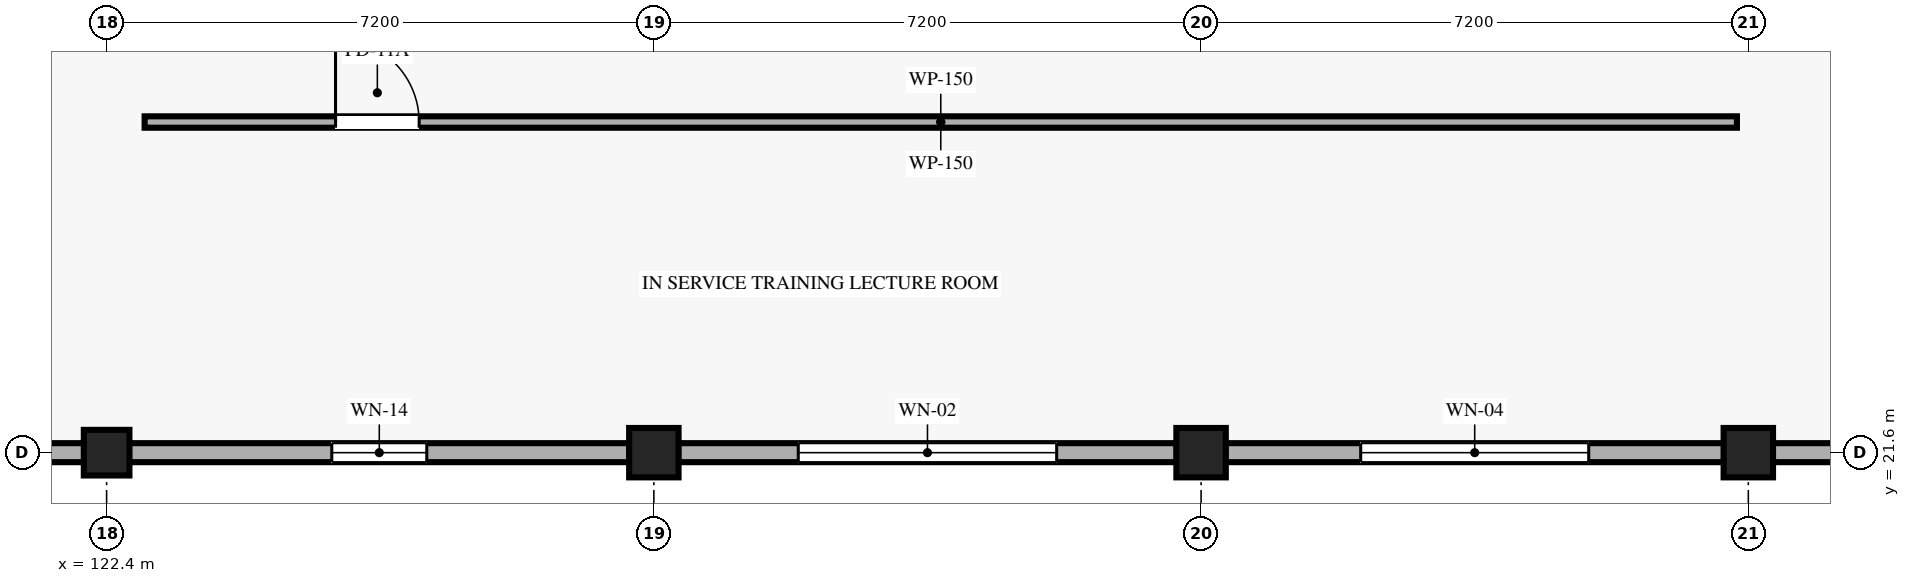
"""IFC4 building model, lengths in metres.
Left out: names, types, materials, properties, quantities, classifications, styles, units other than length and angle.
Written with IfcOpenShell. Run it as: python <this file> out.ifc"""

import sys

from ifc_helpers import new_model, si_unit, direction, frame, frame_2d, origin, origin_2d, place, context, subcontext, project, spatial, rectangle, extrude, element, fill, save


model = new_model("IFC4")
c1 = context("Model", 3, precision=1e-05, world=origin(), true_north=direction((0.0, 1.0)))
c2 = subcontext(c1, "Body", "Model", "MODEL_VIEW")
j1 = project(units=[si_unit("LENGTHUNIT", "METRE"), si_unit("PLANEANGLEUNIT", "RADIAN")], contexts=[c1])
p1 = place(None, origin())
s1 = spatial("IfcSite", under=j1, at=p1, CompositionType="ELEMENT")
p2 = place(p1, origin())
s2 = spatial("IfcBuilding", under=s1, at=p2, CompositionType="ELEMENT")
p3 = place(p2, frame((0.0, 0.0, 13.5)))
s3 = spatial("IfcBuildingStorey", under=s2, at=p3, CompositionType="ELEMENT", Elevation=13.5)
p4 = place(p3, frame((122.4, 21.6, 0.0), z_axis=(0.0, 0.0, 1.0), x_axis=(1.0, 0.0, 0.0)))
e1 = element("IfcColumn", 1, at=p4, inside=s3, PredefinedType="COLUMN", context=c2, shape_type="SweptSolid", body=[
    extrude(rectangle(XDim=0.6, YDim=0.6, at=origin_2d()), origin(), (0.0, 0.0, 1.0), 4.05),
])
for number, where, z_axis, x_axis in (
    (2, (129.6, 21.6, 0.0), (0.0, 0.0, 1.0), (1.0, 0.0, 0.0)),
    (3, (136.8, 21.6, 0.0), (0.0, 0.0, 1.0), (1.0, 0.0, 0.0)),
    (4, (144.0, 21.6, 0.0), (0.0, 0.0, 1.0), (1.0, 0.0, 0.0)),
):
    element("IfcColumn", number, at=place(p3, frame(where, z_axis=z_axis, x_axis=x_axis)), inside=s3, PredefinedType="COLUMN", context=c2, shape_type="SweptSolid", body=[
        extrude(rectangle(XDim=0.65, YDim=0.65, at=origin_2d()), origin(), (0.0, 0.0, 1.0), 4.05),
    ])
p5 = place(p3, frame((115.495, 21.6, 0.0), z_axis=(0.0, 0.0, 1.0), x_axis=(1.0, 0.0, 0.0)))
e5 = element("IfcWall", 5, at=p5, inside=s3, PredefinedType="SOLIDWALL", context=c2, shape_type="SweptSolid", body=[
    extrude(rectangle(XDim=6.61, YDim=0.25, at=frame_2d((3.305, 0.0))), origin(), (0.0, 0.0, 1.0), 3.195),
])
p6 = place(p5, frame((2.555, 0.0, 0.85)))
e6 = element("IfcOpeningElement", 6, at=p6, cuts=e5, PredefinedType="OPENING", context=c2, shape_type="SweptSolid", body=[
    extrude(rectangle(XDim=1.5, YDim=2.05, at=frame_2d((0.75, 1.025))), frame((0.0, 0.135, 0.0), z_axis=(0.0, -1.0, 0.0), x_axis=(1.0, 0.0, 0.0)), (0.0, 0.0, 1.0), 0.27),
])
p7 = place(p3, frame((122.695, 21.6, 0.0), z_axis=(0.0, 0.0, 1.0), x_axis=(1.0, 0.0, 0.0)))
e7 = element("IfcWall", 7, at=p7, inside=s3, PredefinedType="SOLIDWALL", context=c2, shape_type="SweptSolid", body=[
    extrude(rectangle(XDim=6.585, YDim=0.25, at=frame_2d((3.292, 0.0))), origin(), (0.0, 0.0, 1.0), 3.195),
])
p8 = place(p7, frame((2.667, 0.0, 0.85)))
e8 = element("IfcOpeningElement", 8, at=p8, cuts=e7, PredefinedType="OPENING", context=c2, shape_type="SweptSolid", body=[
    extrude(rectangle(XDim=1.25, YDim=1.5, at=frame_2d((0.625, 0.75))), frame((0.0, 0.135, 0.0), z_axis=(0.0, -1.0, 0.0), x_axis=(1.0, 0.0, 0.0)), (0.0, 0.0, 1.0), 0.27),
])
p9 = place(p3, frame((129.92, 21.6, 0.0), z_axis=(0.0, 0.0, 1.0), x_axis=(1.0, 0.0, 0.0)))
e9 = element("IfcWall", 9, at=p9, inside=s3, PredefinedType="SOLIDWALL", context=c2, shape_type="SweptSolid", body=[
    extrude(rectangle(XDim=6.56, YDim=0.25, at=frame_2d((3.28, 0.0))), origin(), (0.0, 0.0, 1.0), 3.195),
])
p10 = place(p9, frame((1.58, 0.0, 0.85)))
e10 = element("IfcOpeningElement", 10, at=p10, cuts=e9, PredefinedType="OPENING", context=c2, shape_type="SweptSolid", body=[
    extrude(rectangle(XDim=3.4, YDim=2.0, at=frame_2d((1.7, 1.0))), frame((0.0, 0.135, 0.0), z_axis=(0.0, -1.0, 0.0), x_axis=(1.0, 0.0, 0.0)), (0.0, 0.0, 1.0), 0.27),
])
p11 = place(p3, frame((137.12, 21.6, 0.0), z_axis=(0.0, 0.0, 1.0), x_axis=(1.0, 0.0, 0.0)))
e11 = element("IfcWall", 11, at=p11, inside=s3, PredefinedType="SOLIDWALL", context=c2, shape_type="SweptSolid", body=[
    extrude(rectangle(XDim=6.56, YDim=0.25, at=frame_2d((3.28, 0.0))), origin(), (0.0, 0.0, 1.0), 3.195),
])
p12 = place(p11, frame((1.78, 0.0, 0.85)))
e12 = element("IfcOpeningElement", 12, at=p12, cuts=e11, PredefinedType="OPENING", context=c2, shape_type="SweptSolid", body=[
    extrude(rectangle(XDim=3.0, YDim=1.9, at=frame_2d((1.5, 0.95))), frame((0.0, 0.135, 0.0), z_axis=(0.0, -1.0, 0.0), x_axis=(1.0, 0.0, 0.0)), (0.0, 0.0, 1.0), 0.27),
])
p13 = place(p3, frame((144.32, 21.6, 0.0), z_axis=(0.0, 0.0, 1.0), x_axis=(1.0, 0.0, 0.0)))
e13 = element("IfcWall", 13, at=p13, inside=s3, PredefinedType="SOLIDWALL", context=c2, shape_type="SweptSolid", body=[
    extrude(rectangle(XDim=6.56, YDim=0.25, at=frame_2d((3.28, 0.0))), origin(), (0.0, 0.0, 1.0), 3.195),
])
p14 = place(p13, frame((1.98, 0.0, 0.85)))
e14 = element("IfcOpeningElement", 14, at=p14, cuts=e13, PredefinedType="OPENING", context=c2, shape_type="SweptSolid", body=[
    extrude(rectangle(XDim=2.6, YDim=1.8, at=frame_2d((1.3, 0.9))), frame((0.0, 0.135, 0.0), z_axis=(0.0, -1.0, 0.0), x_axis=(1.0, 0.0, 0.0)), (0.0, 0.0, 1.0), 0.27),
])
p15 = place(p3, frame((122.9, 25.95, 0.0), z_axis=(0.0, 0.0, 1.0), x_axis=(1.0, 0.0, 0.0)))
e15 = element("IfcWall", 15, at=p15, inside=s3, PredefinedType="PARTITIONING", context=c2, shape_type="SweptSolid", body=[
    extrude(rectangle(XDim=20.95, YDim=0.15, at=frame_2d((10.475, 0.0))), origin(), (0.0, 0.0, 1.0), 3.81),
])
p16 = place(p15, frame((2.512, 0.0, 0.0)))
e16 = element("IfcOpeningElement", 16, at=p16, cuts=e15, PredefinedType="OPENING", context=c2, shape_type="SweptSolid", body=[
    extrude(rectangle(XDim=1.1, YDim=2.2, at=frame_2d((0.55, 1.1))), frame((0.0, 0.085, 0.0), z_axis=(0.0, -1.0, 0.0), x_axis=(1.0, 0.0, 0.0)), (0.0, 0.0, 1.0), 0.17),
])
p17 = place(p8, origin())
e17 = element("IfcWindow", 17, at=p17, inside=s3, PartitioningType="SINGLE_PANEL", PredefinedType="WINDOW", context=c2, shape_type="SweptSolid", body=[
    extrude(rectangle(XDim=1.25, YDim=1.5, at=frame_2d((0.625, 0.75))), frame((0.0, 0.03, 0.0), z_axis=(0.0, -1.0, 0.0), x_axis=(1.0, 0.0, 0.0)), (0.0, 0.0, 1.0), 0.06),
])
fill(e8, e17)
p18 = place(p10, origin())
e18 = element("IfcWindow", 18, at=p18, inside=s3, PartitioningType="SINGLE_PANEL", PredefinedType="WINDOW", context=c2, shape_type="SweptSolid", body=[
    extrude(rectangle(XDim=3.4, YDim=2.0, at=frame_2d((1.7, 1.0))), frame((0.0, 0.03, 0.0), z_axis=(0.0, -1.0, 0.0), x_axis=(1.0, 0.0, 0.0)), (0.0, 0.0, 1.0), 0.06),
])
fill(e10, e18)
p19 = place(p12, origin())
e19 = element("IfcWindow", 19, at=p19, inside=s3, PartitioningType="SINGLE_PANEL", PredefinedType="WINDOW", context=c2, shape_type="SweptSolid", body=[
    extrude(rectangle(XDim=3.0, YDim=1.9, at=frame_2d((1.5, 0.95))), frame((0.0, 0.03, 0.0), z_axis=(0.0, -1.0, 0.0), x_axis=(1.0, 0.0, 0.0)), (0.0, 0.0, 1.0), 0.06),
])
fill(e12, e19)
p20 = place(p16, origin())
e20 = element("IfcDoor", 20, at=p20, inside=s3, OperationType="SINGLE_SWING_LEFT", PredefinedType="DOOR", context=c2, shape_type="SweptSolid", body=[
    extrude(rectangle(XDim=1.1, YDim=2.2, at=frame_2d((0.55, 1.1))), frame((0.0, 0.025, 0.0), z_axis=(0.0, -1.0, 0.0), x_axis=(1.0, 0.0, 0.0)), (0.0, 0.0, 1.0), 0.05),
])
fill(e16, e20)
save(model, sys.argv[1])
